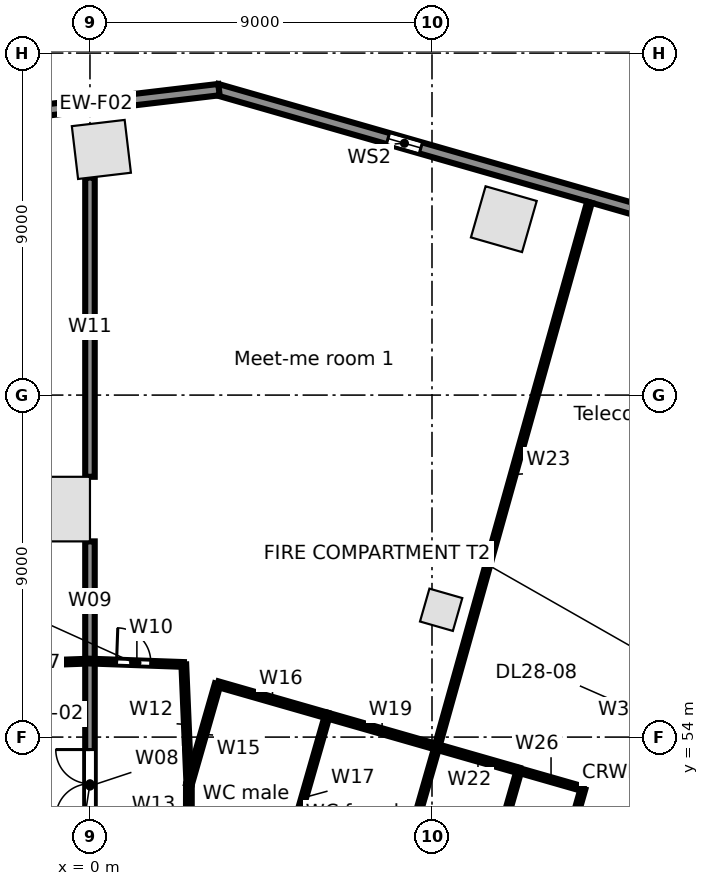
"""IFC4 building model, lengths in metres.
Left out: names, types, materials, properties, quantities, classifications, styles, units other than length and angle.
Written with IfcOpenShell. Run it as: python <this file> out.ifc"""

import sys

from ifc_helpers import new_model, si_unit, direction, frame, frame_2d, origin, origin_2d, place, context, subcontext, project, spatial, rectangle, extrude, element, fill, save


model = new_model("IFC4")
c1 = context("Model", 3, precision=1e-05, world=origin(), true_north=direction((0.0, 1.0)))
c2 = subcontext(c1, "Body", "Model", "MODEL_VIEW")
j1 = project(units=[si_unit("LENGTHUNIT", "METRE"), si_unit("PLANEANGLEUNIT", "RADIAN")], contexts=[c1])
p1 = place(None, origin())
s1 = spatial("IfcSite", under=j1, at=p1, CompositionType="ELEMENT")
p2 = place(p1, origin())
s2 = spatial("IfcBuilding", under=s1, at=p2, CompositionType="ELEMENT")
p3 = place(p2, frame((0.0, 0.0, 145.5)))
s3 = spatial("IfcBuildingStorey", under=s2, at=p3, CompositionType="ELEMENT", Elevation=145.5)
for number, where, z_axis, x_axis in (
    (1, (10.89, 67.629, 0.0), (0.0, 0.0, 1.0), (-0.961, 0.276, 0.0)),
    (2, (0.3, 69.464, 0.0), (0.0, 0.0, 1.0), (-0.993, -0.118, 0.0)),
):
    element("IfcColumn", number, at=place(p3, frame(where, z_axis=z_axis, x_axis=x_axis)), inside=s3, PredefinedType="COLUMN", context=c2, shape_type="SweptSolid", body=[
        extrude(rectangle(XDim=1.4, YDim=1.4, at=origin_2d()), origin(), (0.0, 0.0, 1.0), 4.4),
    ])
p4 = place(p3, frame((-0.85, 60.0, 0.0), z_axis=(0.0, 0.0, 1.0), x_axis=(0.0, 1.0, 0.0)))
e3 = element("IfcColumn", 3, at=p4, inside=s3, PredefinedType="COLUMN", context=c2, shape_type="SweptSolid", body=[
    extrude(rectangle(XDim=1.7, YDim=1.7, at=origin_2d()), origin(), (0.0, 0.0, 1.0), 4.4),
])
p5 = place(p3, frame((9.241, 57.35, 0.0), z_axis=(0.0, 0.0, 1.0), x_axis=(0.961261695938, -0.275637355817, 0.0)))
e4 = element("IfcColumn", 4, at=p5, inside=s3, PredefinedType="COLUMN", context=c2, shape_type="SweptSolid", body=[
    extrude(rectangle(XDim=0.9, YDim=0.9, at=origin_2d()), origin(), (0.0, 0.0, 1.0), 4.4),
])
p6 = place(p3, frame((3.335, 71.044, 0.0), z_axis=(0.0, 0.0, 1.0), x_axis=(0.961260130989, -0.275642813387, 0.0)))
e5 = element("IfcWall", 5, at=p6, inside=s3, PredefinedType="STANDARD", context=c2, shape_type="SweptSolid", body=[
    extrude(rectangle(XDim=32.741, YDim=0.3, at=frame_2d((16.371, 0.0))), origin(), (0.0, 0.0, 1.0), 4.05),
])
p7 = place(p6, frame((29.207, 0.0, 0.6)))
e6 = element("IfcOpeningElement", 6, at=p7, cuts=e5, PredefinedType="OPENING", context=c2, shape_type="SweptSolid", body=[
    extrude(rectangle(XDim=0.9, YDim=2.8, at=frame_2d((0.45, 1.4))), frame((0.0, 0.16, 0.0), z_axis=(0.0, -1.0, 0.0), x_axis=(1.0, 0.0, 0.0)), (0.0, 0.0, 1.0), 0.32),
])
p8 = place(p6, frame((21.034, 0.0, 0.6)))
e7 = element("IfcOpeningElement", 7, at=p8, cuts=e5, PredefinedType="OPENING", context=c2, shape_type="SweptSolid", body=[
    extrude(rectangle(XDim=0.9, YDim=2.8, at=frame_2d((0.45, 1.4))), frame((0.0, 0.16, 0.0), z_axis=(0.0, -1.0, 0.0), x_axis=(1.0, 0.0, 0.0)), (0.0, 0.0, 1.0), 0.32),
])
p9 = place(p6, frame((12.861, 0.0, 0.6)))
e8 = element("IfcOpeningElement", 8, at=p9, cuts=e5, PredefinedType="OPENING", context=c2, shape_type="SweptSolid", body=[
    extrude(rectangle(XDim=0.9, YDim=2.8, at=frame_2d((0.45, 1.4))), frame((0.0, 0.16, 0.0), z_axis=(0.0, -1.0, 0.0), x_axis=(1.0, 0.0, 0.0)), (0.0, 0.0, 1.0), 0.32),
])
p10 = place(p6, frame((4.688, 0.0, 0.6)))
e9 = element("IfcOpeningElement", 9, at=p10, cuts=e5, PredefinedType="OPENING", context=c2, shape_type="SweptSolid", body=[
    extrude(rectangle(XDim=0.9, YDim=2.8, at=frame_2d((0.45, 1.4))), frame((0.0, 0.16, 0.0), z_axis=(0.0, -1.0, 0.0), x_axis=(1.0, 0.0, 0.0)), (0.0, 0.0, 1.0), 0.32),
])
p11 = place(p3, frame((-3.076, 70.273, 0.0), z_axis=(0.0, 0.0, 1.0), x_axis=(0.993067743007, 0.117543429416, 0.0)))
e10 = element("IfcWall", 10, at=p11, inside=s3, PredefinedType="STANDARD", context=c2, shape_type="SweptSolid", body=[
    extrude(rectangle(XDim=6.516, YDim=0.3, at=frame_2d((3.258, 0.0))), origin(), (0.0, 0.0, 1.0), 4.05),
])
p12 = place(p3, frame((-2.67, 55.904, 0.0), z_axis=(0.0, 0.0, 1.0), x_axis=(0.999354913865, 0.03591317494, 0.0)))
e11 = element("IfcWall", 11, at=p12, inside=s3, PredefinedType="PARTITIONING", context=c2, shape_type="SweptSolid", body=[
    extrude(rectangle(XDim=2.672, YDim=0.125, at=frame_2d((1.336, 0.0))), origin(), (0.0, 0.0, 1.0), 4.05),
])
p13 = place(p3, frame((0.0, 49.422, 0.0), z_axis=(0.0, 0.0, 1.0), x_axis=(0.0, 1.0, 0.0)))
e12 = element("IfcWall", 12, at=p13, inside=s3, PredefinedType="PARTITIONING", context=c2, shape_type="SweptSolid", body=[
    extrude(rectangle(XDim=6.578, YDim=0.25, at=frame_2d((3.289, 0.0))), origin(), (0.0, 0.0, 1.0), 3.23),
])
p14 = place(p13, frame((2.45, 0.0, 0.0)))
e13 = element("IfcOpeningElement", 13, at=p14, cuts=e12, PredefinedType="OPENING", context=c2, shape_type="SweptSolid", body=[
    extrude(rectangle(XDim=1.8, YDim=2.1, at=frame_2d((0.9, 1.05))), frame((0.0, 0.135, 0.0), z_axis=(0.0, -1.0, 0.0), x_axis=(1.0, 0.0, 0.0)), (0.0, 0.0, 1.0), 0.27),
])
p15 = place(p3, frame((0.0, 56.0, 0.0), z_axis=(0.0, 0.0, 1.0), x_axis=(0.0, 1.0, 0.0)))
e14 = element("IfcWall", 14, at=p15, inside=s3, PredefinedType="PARTITIONING", context=c2, shape_type="SweptSolid", body=[
    extrude(rectangle(XDim=3.15, YDim=0.25, at=frame_2d((1.575, 0.0))), origin(), (0.0, 0.0, 1.0), 4.05),
])
p16 = place(p3, frame((0.0, 56.0, 0.0), z_axis=(0.0, 0.0, 1.0), x_axis=(0.999349313684, -0.036068673934, 0.0)))
e15 = element("IfcWall", 15, at=p16, inside=s3, PredefinedType="PARTITIONING", context=c2, shape_type="SweptSolid", body=[
    extrude(rectangle(XDim=2.471, YDim=0.125, at=frame_2d((1.235, 0.0))), origin(), (0.0, 0.0, 1.0), 4.05),
])
p17 = place(p16, frame((0.7, 0.0, 0.0)))
e16 = element("IfcOpeningElement", 16, at=p17, cuts=e15, PredefinedType="OPENING", context=c2, shape_type="SweptSolid", body=[
    extrude(rectangle(XDim=0.9, YDim=2.1, at=frame_2d((0.45, 1.05))), frame((0.0, 0.073, 0.0), z_axis=(0.0, -1.0, 0.0), x_axis=(1.0, 0.0, 0.0)), (0.0, 0.0, 1.0), 0.145),
])
p18 = place(p3, frame((0.0, 60.85, 0.0), z_axis=(0.0, 0.0, 1.0), x_axis=(0.0, 1.0, 0.0)))
e17 = element("IfcWall", 17, at=p18, inside=s3, PredefinedType="PARTITIONING", context=c2, shape_type="SweptSolid", body=[
    extrude(rectangle(XDim=7.874, YDim=0.25, at=frame_2d((3.937, 0.0))), origin(), (0.0, 0.0, 1.0), 3.23),
])
p19 = place(p3, frame((2.469, 55.911, 0.0), z_axis=(0.0, 0.0, 1.0), x_axis=(0.042391721597, -0.99910106693, 0.0)))
e18 = element("IfcWall", 18, at=p19, inside=s3, PredefinedType="PARTITIONING", context=c2, shape_type="SweptSolid", body=[
    extrude(rectangle(XDim=3.162, YDim=0.125, at=frame_2d((1.581, 0.0))), origin(), (0.0, 0.0, 1.0), 4.05),
])
p20 = place(p3, frame((2.601, 50.932, 0.0), z_axis=(0.0, 0.0, 1.0), x_axis=(0.001073104681, 0.999999424223, 0.0)))
e19 = element("IfcWall", 19, at=p20, inside=s3, PredefinedType="PARTITIONING", context=c2, shape_type="SweptSolid", body=[
    extrude(rectangle(XDim=1.82, YDim=0.15, at=frame_2d((0.91, 0.0))), origin(), (0.0, 0.0, 1.0), 4.05),
])
p21 = place(p3, frame((2.603, 52.752, 0.0), z_axis=(0.0, 0.0, 1.0), x_axis=(0.27569433145, 0.961245356611, 0.0)))
e20 = element("IfcWall", 20, at=p21, inside=s3, PredefinedType="PARTITIONING", context=c2, shape_type="SweptSolid", body=[
    extrude(rectangle(XDim=2.75, YDim=0.15, at=frame_2d((1.375, 0.0))), origin(), (0.0, 0.0, 1.0), 4.05),
])
p22 = place(p3, frame((3.361, 55.395, 0.0), z_axis=(0.0, 0.0, 1.0), x_axis=(0.961268664977, -0.27561305073, 0.0)))
e21 = element("IfcWall", 21, at=p22, inside=s3, PredefinedType="PARTITIONING", context=c2, shape_type="SweptSolid", body=[
    extrude(rectangle(XDim=3.0, YDim=0.15, at=frame_2d((1.5, 0.0))), origin(), (0.0, 0.0, 1.0), 4.05),
])
p23 = place(p3, frame((5.004, 50.243, 0.0), z_axis=(0.0, 0.0, 1.0), x_axis=(0.275838825927, 0.961203902464, 0.0)))
e22 = element("IfcWall", 22, at=p23, inside=s3, PredefinedType="PARTITIONING", context=c2, shape_type="SweptSolid", body=[
    extrude(rectangle(XDim=4.5, YDim=0.125, at=frame_2d((2.25, 0.0))), origin(), (0.0, 0.0, 1.0), 4.05),
])
p24 = place(p3, frame((6.245, 54.568, 0.0), z_axis=(0.0, 0.0, 1.0), x_axis=(0.961240918172, -0.275709806194, 0.0)))
e23 = element("IfcWall", 23, at=p24, inside=s3, PredefinedType="PARTITIONING", context=c2, shape_type="SweptSolid", body=[
    extrude(rectangle(XDim=3.0, YDim=0.15, at=frame_2d((1.5, 0.0))), origin(), (0.0, 0.0, 1.0), 3.23),
])
p25 = place(p3, frame((7.888, 49.416, 0.0), z_axis=(0.0, 0.0, 1.0), x_axis=(0.275803080638, 0.96121415965, 0.0)))
e24 = element("IfcWall", 24, at=p25, inside=s3, PredefinedType="PARTITIONING", context=c2, shape_type="SweptSolid", body=[
    extrude(rectangle(XDim=4.5, YDim=0.125, at=frame_2d((2.25, 0.0))), origin(), (0.0, 0.0, 1.0), 3.23),
])
p26 = place(p3, frame((9.129, 53.741, 0.0), z_axis=(0.0, 0.0, 1.0), x_axis=(0.961273691875, -0.275595517578, 0.0)))
e25 = element("IfcWall", 25, at=p26, inside=s3, PredefinedType="PARTITIONING", context=c2, shape_type="SweptSolid", body=[
    extrude(rectangle(XDim=2.249, YDim=0.15, at=frame_2d((1.125, 0.0))), origin(), (0.0, 0.0, 1.0), 3.118),
])
p27 = place(p3, frame((9.129, 53.741, 0.0), z_axis=(0.0, 0.0, 1.0), x_axis=(0.269791738843, 0.962918697322, 0.0)))
e26 = element("IfcWall", 26, at=p27, inside=s3, PredefinedType="PARTITIONING", context=c2, shape_type="SweptSolid", body=[
    extrude(rectangle(XDim=14.886, YDim=0.125, at=frame_2d((7.443, 0.0))), origin(), (0.0, 0.0, 1.0), 3.118),
])
p28 = place(p3, frame((10.051, 48.795, 0.0), z_axis=(0.0, 0.0, 1.0), x_axis=(0.275530671241, 0.961292280841, 0.0)))
e27 = element("IfcWall", 27, at=p28, inside=s3, PredefinedType="PARTITIONING", context=c2, shape_type="SweptSolid", body=[
    extrude(rectangle(XDim=4.5, YDim=0.125, at=frame_2d((2.25, 0.0))), origin(), (0.0, 0.0, 1.0), 4.05),
])
p29 = place(p3, frame((11.291, 53.121, 0.0), z_axis=(0.0, 0.0, 1.0), x_axis=(0.961329010357, -0.275402494264, 0.0)))
e28 = element("IfcWall", 28, at=p29, inside=s3, PredefinedType="PARTITIONING", context=c2, shape_type="SweptSolid", body=[
    extrude(rectangle(XDim=1.751, YDim=0.125, at=frame_2d((0.875, 0.0))), origin(), (0.0, 0.0, 1.0), 4.05),
])
p30 = place(p3, frame((11.733, 48.313, 0.0), z_axis=(0.0, 0.0, 1.0), x_axis=(0.275795676316, 0.961216284155, 0.0)))
e29 = element("IfcWall", 29, at=p30, inside=s3, PredefinedType="PARTITIONING", context=c2, shape_type="SweptSolid", body=[
    extrude(rectangle(XDim=4.5, YDim=0.125, at=frame_2d((2.25, 0.0))), origin(), (0.0, 0.0, 1.0), 4.05),
])
p31 = place(p10, origin())
e30 = element("IfcWindow", 30, at=p31, inside=s3, PartitioningType="SINGLE_PANEL", PredefinedType="WINDOW", context=c2, shape_type="SweptSolid", body=[
    extrude(rectangle(XDim=0.9, YDim=2.8, at=frame_2d((0.45, 1.4))), frame((0.0, 0.03, 0.0), z_axis=(0.0, -1.0, 0.0), x_axis=(1.0, 0.0, 0.0)), (0.0, 0.0, 1.0), 0.06),
])
fill(e9, e30)
p32 = place(p17, origin())
e31 = element("IfcDoor", 31, at=p32, inside=s3, OperationType="SINGLE_SWING_LEFT", PredefinedType="DOOR", context=c2, shape_type="SweptSolid", body=[
    extrude(rectangle(XDim=0.9, YDim=2.1, at=frame_2d((0.45, 1.05))), frame((0.0, 0.025, 0.0), z_axis=(0.0, -1.0, 0.0), x_axis=(1.0, 0.0, 0.0)), (0.0, 0.0, 1.0), 0.05),
])
fill(e16, e31)
p33 = place(p14, origin())
e32 = element("IfcDoor", 32, at=p33, inside=s3, OperationType="DOUBLE_DOOR_SINGLE_SWING", PredefinedType="DOOR", context=c2, shape_type="SweptSolid", body=[
    extrude(rectangle(XDim=1.8, YDim=2.1, at=frame_2d((0.9, 1.05))), frame((0.0, 0.025, 0.0), z_axis=(0.0, -1.0, 0.0), x_axis=(1.0, 0.0, 0.0)), (0.0, 0.0, 1.0), 0.05),
])
fill(e13, e32)
save(model, sys.argv[1])
